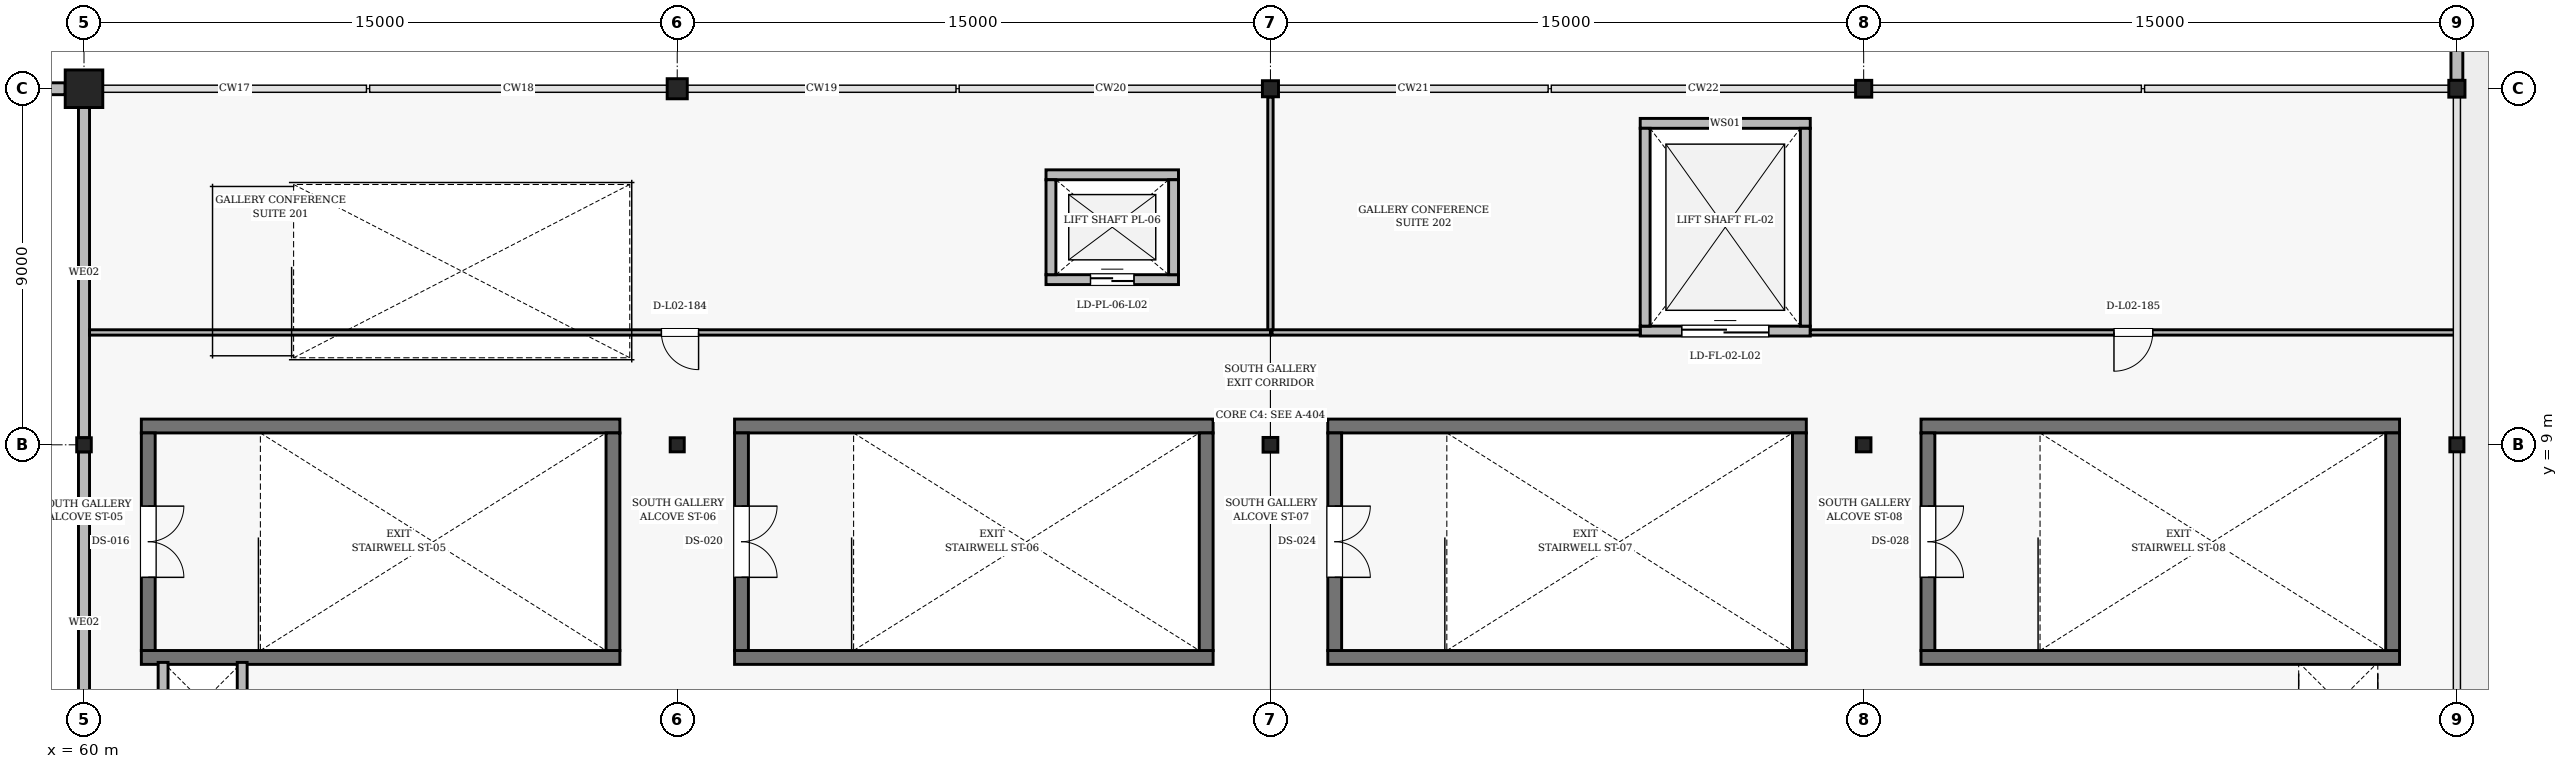
"""IFC4 building model, lengths in metres.
Left out: names, types, materials, properties, quantities, classifications, styles, units other than length and angle.
Written with IfcOpenShell. Run it as: python <this file> out.ifc"""

import sys

from ifc_helpers import new_model, si_unit, direction, frame, frame_2d, origin, origin_2d, place, context, subcontext, project, spatial, rectangle, hollow_circle, i_section, extrude, element, fill, save


model = new_model("IFC4")
c1 = context("Model", 3, precision=1e-05, world=origin(), true_north=direction((0.0, 1.0)))
c2 = subcontext(c1, "Body", "Model", "MODEL_VIEW")
j1 = project(units=[si_unit("LENGTHUNIT", "METRE"), si_unit("PLANEANGLEUNIT", "RADIAN")], contexts=[c1])
p1 = place(None, origin())
s1 = spatial("IfcSite", under=j1, at=p1, CompositionType="ELEMENT")
p2 = place(p1, origin())
s2 = spatial("IfcBuilding", under=s1, at=p2, CompositionType="ELEMENT")
p3 = place(p2, frame((0.0, 0.0, 10.8)))
s3 = spatial("IfcBuildingStorey", under=s2, at=p3, CompositionType="ELEMENT", Elevation=10.8)
p4 = place(p3, frame((60.0, 9.0, 0.0), z_axis=(0.0, 0.0, 1.0), x_axis=(1.0, 0.0, 0.0)))
e1 = element("IfcColumn", 1, at=p4, inside=s3, PredefinedType="COLUMN", context=c2, shape_type="SweptSolid", body=[
    extrude(i_section(OverallWidth=0.369, OverallDepth=0.356, WebThickness=0.011, FlangeThickness=0.018, FilletRadius=0.015, at=origin_2d()), origin(), (0.0, 0.0, 1.0), 4.625),
])
p5 = place(p3, frame((60.0, 18.0, 0.0), z_axis=(0.0, 0.0, 1.0), x_axis=(1.0, 0.0, 0.0)))
e2 = element("IfcColumn", 2, at=p5, inside=s3, PredefinedType="COLUMN", context=c2, shape_type="SweptSolid", body=[
    extrude(rectangle(XDim=0.95, YDim=0.95, at=origin_2d()), origin(), (0.0, 0.0, 1.0), 4.59),
])
p6 = place(p3, frame((75.0, 9.0, 0.0), z_axis=(0.0, 0.0, 1.0), x_axis=(1.0, 0.0, 0.0)))
e3 = element("IfcColumn", 3, at=p6, inside=s3, PredefinedType="COLUMN", context=c2, shape_type="SweptSolid", body=[
    extrude(hollow_circle(Radius=0.178, WallThickness=0.016, at=origin_2d()), origin(), (0.0, 0.0, 1.0), 4.625),
])
p7 = place(p3, frame((75.0, 18.0, 0.0), z_axis=(0.0, 0.0, 1.0), x_axis=(1.0, 0.0, 0.0)))
e4 = element("IfcColumn", 4, at=p7, inside=s3, PredefinedType="COLUMN", context=c2, shape_type="SweptSolid", body=[
    extrude(hollow_circle(Radius=0.254, WallThickness=0.02, at=origin_2d()), origin(), (0.0, 0.0, 1.0), 4.59),
])
p8 = place(p3, frame((90.0, 9.0, 0.0), z_axis=(0.0, 0.0, 1.0), x_axis=(1.0, 0.0, 0.0)))
e5 = element("IfcColumn", 5, at=p8, inside=s3, PredefinedType="COLUMN", context=c2, shape_type="SweptSolid", body=[
    extrude(i_section(OverallWidth=0.374, OverallDepth=0.372, WebThickness=0.016, FlangeThickness=0.026, FilletRadius=0.016, at=origin_2d()), origin(), (0.0, 0.0, 1.0), 4.625),
])
p9 = place(p3, frame((90.0, 18.0, 0.0), z_axis=(0.0, 0.0, 1.0), x_axis=(1.0, 0.0, 0.0)))
e6 = element("IfcColumn", 6, at=p9, inside=s3, PredefinedType="COLUMN", context=c2, shape_type="SweptSolid", body=[
    extrude(hollow_circle(Radius=0.203, WallThickness=0.016, at=origin_2d()), origin(), (0.0, 0.0, 1.0), 4.59),
])
p10 = place(p3, frame((105.0, 9.0, 0.0), z_axis=(0.0, 0.0, 1.0), x_axis=(1.0, 0.0, 0.0)))
e7 = element("IfcColumn", 7, at=p10, inside=s3, PredefinedType="COLUMN", context=c2, shape_type="SweptSolid", body=[
    extrude(i_section(OverallWidth=0.369, OverallDepth=0.356, WebThickness=0.011, FlangeThickness=0.018, FilletRadius=0.015, at=origin_2d()), origin(), (0.0, 0.0, 1.0), 4.625),
])
p11 = place(p3, frame((105.0, 18.0, 0.0), z_axis=(0.0, 0.0, 1.0), x_axis=(1.0, 0.0, 0.0)))
e8 = element("IfcColumn", 8, at=p11, inside=s3, PredefinedType="COLUMN", context=c2, shape_type="SweptSolid", body=[
    extrude(i_section(OverallWidth=0.409, OverallDepth=0.425, WebThickness=0.031, FlangeThickness=0.049, FilletRadius=0.02, at=origin_2d()), origin(), (0.0, 0.0, 1.0), 4.625),
])
p12 = place(p3, frame((120.0, 9.0, 0.0), z_axis=(0.0, 0.0, 1.0), x_axis=(1.0, 0.0, 0.0)))
e9 = element("IfcColumn", 9, at=p12, inside=s3, PredefinedType="COLUMN", context=c2, shape_type="SweptSolid", body=[
    extrude(hollow_circle(Radius=0.178, WallThickness=0.016, at=origin_2d()), origin(), (0.0, 0.0, 1.0), 4.625),
])
p13 = place(p3, frame((120.0, 18.0, 0.0), z_axis=(0.0, 0.0, 1.0), x_axis=(1.0, 0.0, 0.0)))
e10 = element("IfcColumn", 10, at=p13, inside=s3, PredefinedType="COLUMN", context=c2, shape_type="SweptSolid", body=[
    extrude(i_section(OverallWidth=0.409, OverallDepth=0.425, WebThickness=0.031, FlangeThickness=0.049, FilletRadius=0.02, at=origin_2d()), origin(), (0.0, 0.0, 1.0), 4.625),
])
p14 = place(p3, frame((59.525, 18.0, 0.0), z_axis=(0.0, 0.0, 1.0), x_axis=(-1.0, 0.0, 0.0)))
e11 = element("IfcWall", 11, at=p14, inside=s3, PredefinedType="SOLIDWALL", context=c2, shape_type="SweptSolid", body=[
    extrude(rectangle(XDim=14.322, YDim=0.3, at=frame_2d((7.161, 0.0))), origin(), (0.0, 0.0, 1.0), 4.6),
])
p15 = place(p3, frame((60.0, 0.186, 0.0), z_axis=(0.0, 0.0, 1.0), x_axis=(0.0, 1.0, 0.0)))
e12 = element("IfcWall", 12, at=p15, inside=s3, PredefinedType="SOLIDWALL", context=c2, shape_type="SweptSolid", body=[
    extrude(rectangle(XDim=8.636, YDim=0.28, at=frame_2d((4.318, 0.0))), origin(), (0.0, 0.0, 1.0), 3.865),
])
p16 = place(p3, frame((60.0, 9.178, 0.0), z_axis=(0.0, 0.0, 1.0), x_axis=(0.0, 1.0, 0.0)))
e13 = element("IfcWall", 13, at=p16, inside=s3, PredefinedType="SOLIDWALL", context=c2, shape_type="SweptSolid", body=[
    extrude(rectangle(XDim=8.347, YDim=0.28, at=frame_2d((4.173, 0.0))), origin(), (0.0, 0.0, 1.0), 3.876),
])
p17 = place(p3, frame((120.0, 26.525, 0.0), z_axis=(0.0, 0.0, 1.0), x_axis=(0.0, -1.0, 0.0)))
e14 = element("IfcWall", 14, at=p17, inside=s3, PredefinedType="SOLIDWALL", context=c2, shape_type="SweptSolid", body=[
    extrude(rectangle(XDim=8.312, YDim=0.3, at=frame_2d((4.156, 0.0))), origin(), (0.0, 0.0, 1.0), 4.246),
])
for number, where, z_axis, x_axis in (
    (15, (61.45, 3.625, 0.0), (0.0, 0.0, 1.0), (1.0, 0.0, 0.0)),
    (16, (73.55, 9.475, 0.0), (0.0, 0.0, 1.0), (-1.0, 0.0, 0.0)),
):
    element("IfcWall", number, at=place(p3, frame(where, z_axis=z_axis, x_axis=x_axis)), inside=s3, PredefinedType="SHEAR", context=c2, shape_type="SweptSolid", body=[
        extrude(rectangle(XDim=12.1, YDim=0.35, at=frame_2d((6.05, 0.0))), origin(), (0.0, 0.0, 1.0), 4.625),
    ])
p18 = place(p3, frame((61.625, 9.3, 0.0), z_axis=(0.0, 0.0, 1.0), x_axis=(0.0, -1.0, 0.0)))
e17 = element("IfcWall", 17, at=p18, inside=s3, PredefinedType="SHEAR", context=c2, shape_type="SweptSolid", body=[
    extrude(rectangle(XDim=5.5, YDim=0.35, at=frame_2d((2.75, 0.0))), origin(), (0.0, 0.0, 1.0), 4.625),
])
p19 = place(p18, frame((1.85, 0.0, 0.0)))
e18 = element("IfcOpeningElement", 18, at=p19, cuts=e17, PredefinedType="OPENING", context=c2, shape_type="SweptSolid", body=[
    extrude(rectangle(XDim=1.8, YDim=2.2, at=frame_2d((0.9, 1.1))), frame((0.0, 0.185, 0.0), z_axis=(0.0, -1.0, 0.0), x_axis=(1.0, 0.0, 0.0)), (0.0, 0.0, 1.0), 0.37),
])
p20 = place(p3, frame((73.375, 3.8, 0.0), z_axis=(0.0, 0.0, 1.0), x_axis=(0.0, 1.0, 0.0)))
e19 = element("IfcWall", 19, at=p20, inside=s3, PredefinedType="SHEAR", context=c2, shape_type="SweptSolid", body=[
    extrude(rectangle(XDim=5.5, YDim=0.35, at=frame_2d((2.75, 0.0))), origin(), (0.0, 0.0, 1.0), 4.625),
])
for number, where, z_axis, x_axis in (
    (20, (76.45, 3.625, 0.0), (0.0, 0.0, 1.0), (1.0, 0.0, 0.0)),
    (21, (88.55, 9.475, 0.0), (0.0, 0.0, 1.0), (-1.0, 0.0, 0.0)),
):
    element("IfcWall", number, at=place(p3, frame(where, z_axis=z_axis, x_axis=x_axis)), inside=s3, PredefinedType="SHEAR", context=c2, shape_type="SweptSolid", body=[
        extrude(rectangle(XDim=12.1, YDim=0.35, at=frame_2d((6.05, 0.0))), origin(), (0.0, 0.0, 1.0), 4.625),
    ])
p21 = place(p3, frame((76.625, 9.3, 0.0), z_axis=(0.0, 0.0, 1.0), x_axis=(0.0, -1.0, 0.0)))
e22 = element("IfcWall", 22, at=p21, inside=s3, PredefinedType="SHEAR", context=c2, shape_type="SweptSolid", body=[
    extrude(rectangle(XDim=5.5, YDim=0.35, at=frame_2d((2.75, 0.0))), origin(), (0.0, 0.0, 1.0), 4.625),
])
p22 = place(p21, frame((1.85, 0.0, 0.0)))
e23 = element("IfcOpeningElement", 23, at=p22, cuts=e22, PredefinedType="OPENING", context=c2, shape_type="SweptSolid", body=[
    extrude(rectangle(XDim=1.8, YDim=2.2, at=frame_2d((0.9, 1.1))), frame((0.0, 0.185, 0.0), z_axis=(0.0, -1.0, 0.0), x_axis=(1.0, 0.0, 0.0)), (0.0, 0.0, 1.0), 0.37),
])
p23 = place(p3, frame((88.375, 3.8, 0.0), z_axis=(0.0, 0.0, 1.0), x_axis=(0.0, 1.0, 0.0)))
e24 = element("IfcWall", 24, at=p23, inside=s3, PredefinedType="SHEAR", context=c2, shape_type="SweptSolid", body=[
    extrude(rectangle(XDim=5.5, YDim=0.35, at=frame_2d((2.75, 0.0))), origin(), (0.0, 0.0, 1.0), 4.625),
])
for number, where, z_axis, x_axis in (
    (25, (91.45, 3.625, 0.0), (0.0, 0.0, 1.0), (1.0, 0.0, 0.0)),
    (26, (103.55, 9.475, 0.0), (0.0, 0.0, 1.0), (-1.0, 0.0, 0.0)),
):
    element("IfcWall", number, at=place(p3, frame(where, z_axis=z_axis, x_axis=x_axis)), inside=s3, PredefinedType="SHEAR", context=c2, shape_type="SweptSolid", body=[
        extrude(rectangle(XDim=12.1, YDim=0.35, at=frame_2d((6.05, 0.0))), origin(), (0.0, 0.0, 1.0), 4.625),
    ])
p24 = place(p3, frame((91.625, 9.3, 0.0), z_axis=(0.0, 0.0, 1.0), x_axis=(0.0, -1.0, 0.0)))
e27 = element("IfcWall", 27, at=p24, inside=s3, PredefinedType="SHEAR", context=c2, shape_type="SweptSolid", body=[
    extrude(rectangle(XDim=5.5, YDim=0.35, at=frame_2d((2.75, 0.0))), origin(), (0.0, 0.0, 1.0), 4.625),
])
p25 = place(p24, frame((1.85, 0.0, 0.0)))
e28 = element("IfcOpeningElement", 28, at=p25, cuts=e27, PredefinedType="OPENING", context=c2, shape_type="SweptSolid", body=[
    extrude(rectangle(XDim=1.8, YDim=2.2, at=frame_2d((0.9, 1.1))), frame((0.0, 0.185, 0.0), z_axis=(0.0, -1.0, 0.0), x_axis=(1.0, 0.0, 0.0)), (0.0, 0.0, 1.0), 0.37),
])
p26 = place(p3, frame((103.375, 3.8, 0.0), z_axis=(0.0, 0.0, 1.0), x_axis=(0.0, 1.0, 0.0)))
e29 = element("IfcWall", 29, at=p26, inside=s3, PredefinedType="SHEAR", context=c2, shape_type="SweptSolid", body=[
    extrude(rectangle(XDim=5.5, YDim=0.35, at=frame_2d((2.75, 0.0))), origin(), (0.0, 0.0, 1.0), 4.625),
])
for number, where, z_axis, x_axis in (
    (30, (106.45, 3.625, 0.0), (0.0, 0.0, 1.0), (1.0, 0.0, 0.0)),
    (31, (118.55, 9.475, 0.0), (0.0, 0.0, 1.0), (-1.0, 0.0, 0.0)),
):
    element("IfcWall", number, at=place(p3, frame(where, z_axis=z_axis, x_axis=x_axis)), inside=s3, PredefinedType="SHEAR", context=c2, shape_type="SweptSolid", body=[
        extrude(rectangle(XDim=12.1, YDim=0.35, at=frame_2d((6.05, 0.0))), origin(), (0.0, 0.0, 1.0), 4.625),
    ])
p27 = place(p3, frame((106.625, 9.3, 0.0), z_axis=(0.0, 0.0, 1.0), x_axis=(0.0, -1.0, 0.0)))
e32 = element("IfcWall", 32, at=p27, inside=s3, PredefinedType="SHEAR", context=c2, shape_type="SweptSolid", body=[
    extrude(rectangle(XDim=5.5, YDim=0.35, at=frame_2d((2.75, 0.0))), origin(), (0.0, 0.0, 1.0), 4.625),
])
p28 = place(p27, frame((1.85, 0.0, 0.0)))
e33 = element("IfcOpeningElement", 33, at=p28, cuts=e32, PredefinedType="OPENING", context=c2, shape_type="SweptSolid", body=[
    extrude(rectangle(XDim=1.8, YDim=2.2, at=frame_2d((0.9, 1.1))), frame((0.0, 0.185, 0.0), z_axis=(0.0, -1.0, 0.0), x_axis=(1.0, 0.0, 0.0)), (0.0, 0.0, 1.0), 0.37),
])
p29 = place(p3, frame((118.375, 3.8, 0.0), z_axis=(0.0, 0.0, 1.0), x_axis=(0.0, 1.0, 0.0)))
e34 = element("IfcWall", 34, at=p29, inside=s3, PredefinedType="SHEAR", context=c2, shape_type="SweptSolid", body=[
    extrude(rectangle(XDim=5.5, YDim=0.35, at=frame_2d((2.75, 0.0))), origin(), (0.0, 0.0, 1.0), 4.625),
])
p30 = place(p3, frame((84.325, 13.175, 0.0), z_axis=(0.0, 0.0, 1.0), x_axis=(1.0, 0.0, 0.0)))
e35 = element("IfcWall", 35, at=p30, inside=s3, PredefinedType="SOLIDWALL", context=c2, shape_type="SweptSolid", body=[
    extrude(rectangle(XDim=3.35, YDim=0.25, at=frame_2d((1.675, 0.0))), origin(), (0.0, 0.0, 1.0), 4.6),
])
p31 = place(p30, frame((1.125, 0.0, 0.0)))
e36 = element("IfcOpeningElement", 36, at=p31, cuts=e35, PredefinedType="OPENING", context=c2, shape_type="SweptSolid", body=[
    extrude(rectangle(XDim=1.1, YDim=2.2, at=frame_2d((0.55, 1.1))), frame((0.0, 0.135, 0.0), z_axis=(0.0, -1.0, 0.0), x_axis=(1.0, 0.0, 0.0)), (0.0, 0.0, 1.0), 0.27),
])
p32 = place(p3, frame((87.675, 15.825, 0.0), z_axis=(0.0, 0.0, 1.0), x_axis=(-1.0, 0.0, 0.0)))
e37 = element("IfcWall", 37, at=p32, inside=s3, PredefinedType="SOLIDWALL", context=c2, shape_type="SweptSolid", body=[
    extrude(rectangle(XDim=3.35, YDim=0.25, at=frame_2d((1.675, 0.0))), origin(), (0.0, 0.0, 1.0), 4.6),
])
for number, where, z_axis, x_axis in (
    (38, (84.45, 15.7, 0.0), (0.0, 0.0, 1.0), (0.0, -1.0, 0.0)),
    (39, (87.55, 13.3, 0.0), (0.0, 0.0, 1.0), (0.0, 1.0, 0.0)),
):
    element("IfcWall", number, at=place(p3, frame(where, z_axis=z_axis, x_axis=x_axis)), inside=s3, PredefinedType="SOLIDWALL", context=c2, shape_type="SweptSolid", body=[
        extrude(rectangle(XDim=2.4, YDim=0.25, at=frame_2d((1.2, 0.0))), origin(), (0.0, 0.0, 1.0), 4.002),
    ])
p33 = place(p3, frame((99.35, 11.875, 0.0), z_axis=(0.0, 0.0, 1.0), x_axis=(1.0, 0.0, 0.0)))
e40 = element("IfcWall", 40, at=p33, inside=s3, PredefinedType="SOLIDWALL", context=c2, shape_type="SweptSolid", body=[
    extrude(rectangle(XDim=4.3, YDim=0.25, at=frame_2d((2.15, 0.0))), origin(), (0.0, 0.0, 1.0), 4.002),
])
p34 = place(p33, frame((1.05, 0.0, 0.0)))
e41 = element("IfcOpeningElement", 41, at=p34, cuts=e40, PredefinedType="OPENING", context=c2, shape_type="SweptSolid", body=[
    extrude(rectangle(XDim=2.2, YDim=2.5, at=frame_2d((1.1, 1.25))), frame((0.0, 0.135, 0.0), z_axis=(0.0, -1.0, 0.0), x_axis=(1.0, 0.0, 0.0)), (0.0, 0.0, 1.0), 0.27),
])
p35 = place(p3, frame((103.65, 17.125, 0.0), z_axis=(0.0, 0.0, 1.0), x_axis=(-1.0, 0.0, 0.0)))
e42 = element("IfcWall", 42, at=p35, inside=s3, PredefinedType="SOLIDWALL", context=c2, shape_type="SweptSolid", body=[
    extrude(rectangle(XDim=4.3, YDim=0.25, at=frame_2d((2.15, 0.0))), origin(), (0.0, 0.0, 1.0), 4.6),
])
for number, where, z_axis, x_axis in (
    (43, (99.475, 17.0, 0.0), (0.0, 0.0, 1.0), (0.0, -1.0, 0.0)),
    (44, (103.525, 12.0, 0.0), (0.0, 0.0, 1.0), (0.0, 1.0, 0.0)),
):
    element("IfcWall", number, at=place(p3, frame(where, z_axis=z_axis, x_axis=x_axis)), inside=s3, PredefinedType="SOLIDWALL", context=c2, shape_type="SweptSolid", body=[
        extrude(rectangle(XDim=5.0, YDim=0.25, at=frame_2d((2.5, 0.0))), origin(), (0.0, 0.0, 1.0), 4.002),
    ])
p36 = place(p3, frame((90.0, 17.79, 0.0), z_axis=(0.0, 0.0, 1.0), x_axis=(0.0, -1.0, 0.0)))
e45 = element("IfcWall", 45, at=p36, inside=s3, PredefinedType="PARTITIONING", context=c2, shape_type="SweptSolid", body=[
    extrude(rectangle(XDim=5.95, YDim=0.135, at=frame_2d((2.975, 0.0))), origin(), (0.0, 0.0, 1.0), 3.926),
])
p37 = place(p3, frame((90.0, 11.84, 0.0), z_axis=(0.0, 0.0, 1.0), x_axis=(-1.0, 0.0, 0.0)))
e46 = element("IfcWall", 46, at=p37, inside=s3, PredefinedType="PARTITIONING", context=c2, shape_type="SweptSolid", body=[
    extrude(rectangle(XDim=29.86, YDim=0.135, at=frame_2d((14.93, 0.0))), origin(), (0.0, 0.0, 1.0), 3.837),
])
p38 = place(p37, frame((14.46, 0.0, 0.0)))
e47 = element("IfcOpeningElement", 47, at=p38, cuts=e46, PredefinedType="OPENING", context=c2, shape_type="SweptSolid", body=[
    extrude(rectangle(XDim=0.94, YDim=2.15, at=frame_2d((0.47, 1.075))), frame((0.0, 0.078, 0.0), z_axis=(0.0, -1.0, 0.0), x_axis=(1.0, 0.0, 0.0)), (0.0, 0.0, 1.0), 0.155),
])
p39 = place(p3, frame((119.988, 11.84, 0.0), z_axis=(0.0, 0.0, 1.0), x_axis=(-1.0, 0.0, 0.0)))
e48 = element("IfcWall", 48, at=p39, inside=s3, PredefinedType="PARTITIONING", context=c2, shape_type="SweptSolid", body=[
    extrude(rectangle(XDim=16.338, YDim=0.135, at=frame_2d((8.169, 0.0))), origin(), (0.0, 0.0, 1.0), 3.837),
])
p40 = place(p39, frame((7.679, 0.0, 0.0)))
e49 = element("IfcOpeningElement", 49, at=p40, cuts=e48, PredefinedType="OPENING", context=c2, shape_type="SweptSolid", body=[
    extrude(rectangle(XDim=0.98, YDim=2.15, at=frame_2d((0.49, 1.075))), frame((0.0, 0.078, 0.0), z_axis=(0.0, -1.0, 0.0), x_axis=(1.0, 0.0, 0.0)), (0.0, 0.0, 1.0), 0.155),
])
p41 = place(p3, frame((99.35, 11.84, 0.0), z_axis=(0.0, 0.0, 1.0), x_axis=(-1.0, 0.0, 0.0)))
e50 = element("IfcWall", 50, at=p41, inside=s3, PredefinedType="PARTITIONING", context=c2, shape_type="SweptSolid", body=[
    extrude(rectangle(XDim=9.31, YDim=0.135, at=frame_2d((4.655, 0.0))), origin(), (0.0, 0.0, 1.0), 3.926),
])
for number, where, z_axis, x_axis in (
    (51, (62.0, 3.5, 0.0), (0.0, 0.0, 1.0), (0.0, -1.0, 0.0)),
    (52, (64.0, 1.5, 0.0), (0.0, 0.0, 1.0), (0.0, 1.0, 0.0)),
):
    element("IfcWall", number, at=place(p3, frame(where, z_axis=z_axis, x_axis=x_axis)), inside=s3, PredefinedType="SOLIDWALL", context=c2, shape_type="SweptSolid", body=[
        extrude(rectangle(XDim=2.0, YDim=0.25, at=frame_2d((1.0, 0.0))), origin(), (0.0, 0.0, 1.0), 4.25),
    ])
p42 = place(p19, origin())
e53 = element("IfcDoor", 53, at=p42, inside=s3, OperationType="DOUBLE_DOOR_SINGLE_SWING", PredefinedType="DOOR", context=c2, shape_type="SweptSolid", body=[
    extrude(rectangle(XDim=1.8, YDim=2.2, at=frame_2d((0.9, 1.1))), frame((0.0, 0.025, 0.0), z_axis=(0.0, -1.0, 0.0), x_axis=(1.0, 0.0, 0.0)), (0.0, 0.0, 1.0), 0.05),
])
fill(e18, e53)
p43 = place(p22, origin())
e54 = element("IfcDoor", 54, at=p43, inside=s3, OperationType="DOUBLE_DOOR_SINGLE_SWING", PredefinedType="DOOR", context=c2, shape_type="SweptSolid", body=[
    extrude(rectangle(XDim=1.8, YDim=2.2, at=frame_2d((0.9, 1.1))), frame((0.0, 0.025, 0.0), z_axis=(0.0, -1.0, 0.0), x_axis=(1.0, 0.0, 0.0)), (0.0, 0.0, 1.0), 0.05),
])
fill(e23, e54)
p44 = place(p25, origin())
e55 = element("IfcDoor", 55, at=p44, inside=s3, OperationType="DOUBLE_DOOR_SINGLE_SWING", PredefinedType="DOOR", context=c2, shape_type="SweptSolid", body=[
    extrude(rectangle(XDim=1.8, YDim=2.2, at=frame_2d((0.9, 1.1))), frame((0.0, 0.025, 0.0), z_axis=(0.0, -1.0, 0.0), x_axis=(1.0, 0.0, 0.0)), (0.0, 0.0, 1.0), 0.05),
])
fill(e28, e55)
p45 = place(p28, origin())
e56 = element("IfcDoor", 56, at=p45, inside=s3, OperationType="DOUBLE_DOOR_SINGLE_SWING", PredefinedType="DOOR", context=c2, shape_type="SweptSolid", body=[
    extrude(rectangle(XDim=1.8, YDim=2.2, at=frame_2d((0.9, 1.1))), frame((0.0, 0.025, 0.0), z_axis=(0.0, -1.0, 0.0), x_axis=(1.0, 0.0, 0.0)), (0.0, 0.0, 1.0), 0.05),
])
fill(e33, e56)
p46 = place(p31, origin())
e57 = element("IfcDoor", 57, at=p46, inside=s3, OperationType="DOUBLE_DOOR_SLIDING", PredefinedType="DOOR", context=c2, shape_type="SweptSolid", body=[
    extrude(rectangle(XDim=1.1, YDim=2.2, at=frame_2d((0.55, 1.1))), frame((0.0, 0.025, 0.0), z_axis=(0.0, -1.0, 0.0), x_axis=(1.0, 0.0, 0.0)), (0.0, 0.0, 1.0), 0.05),
])
fill(e36, e57)
p47 = place(p34, origin())
e58 = element("IfcDoor", 58, at=p47, inside=s3, OperationType="DOUBLE_DOOR_SLIDING", PredefinedType="DOOR", context=c2, shape_type="SweptSolid", body=[
    extrude(rectangle(XDim=2.2, YDim=2.5, at=frame_2d((1.1, 1.25))), frame((0.0, 0.025, 0.0), z_axis=(0.0, -1.0, 0.0), x_axis=(1.0, 0.0, 0.0)), (0.0, 0.0, 1.0), 0.05),
])
fill(e41, e58)
p48 = place(p38, origin())
e59 = element("IfcDoor", 59, at=p48, inside=s3, OperationType="SINGLE_SWING_LEFT", PredefinedType="DOOR", context=c2, shape_type="SweptSolid", body=[
    extrude(rectangle(XDim=0.94, YDim=2.15, at=frame_2d((0.47, 1.075))), frame((0.0, 0.025, 0.0), z_axis=(0.0, -1.0, 0.0), x_axis=(1.0, 0.0, 0.0)), (0.0, 0.0, 1.0), 0.05),
])
fill(e47, e59)
p49 = place(p40, origin())
e60 = element("IfcDoor", 60, at=p49, inside=s3, OperationType="SINGLE_SWING_RIGHT", PredefinedType="DOOR", context=c2, shape_type="SweptSolid", body=[
    extrude(rectangle(XDim=0.98, YDim=2.15, at=frame_2d((0.49, 1.075))), frame((0.0, 0.025, 0.0), z_axis=(0.0, -1.0, 0.0), x_axis=(1.0, 0.0, 0.0)), (0.0, 0.0, 1.0), 0.05),
])
fill(e49, e60)
save(model, sys.argv[1])
